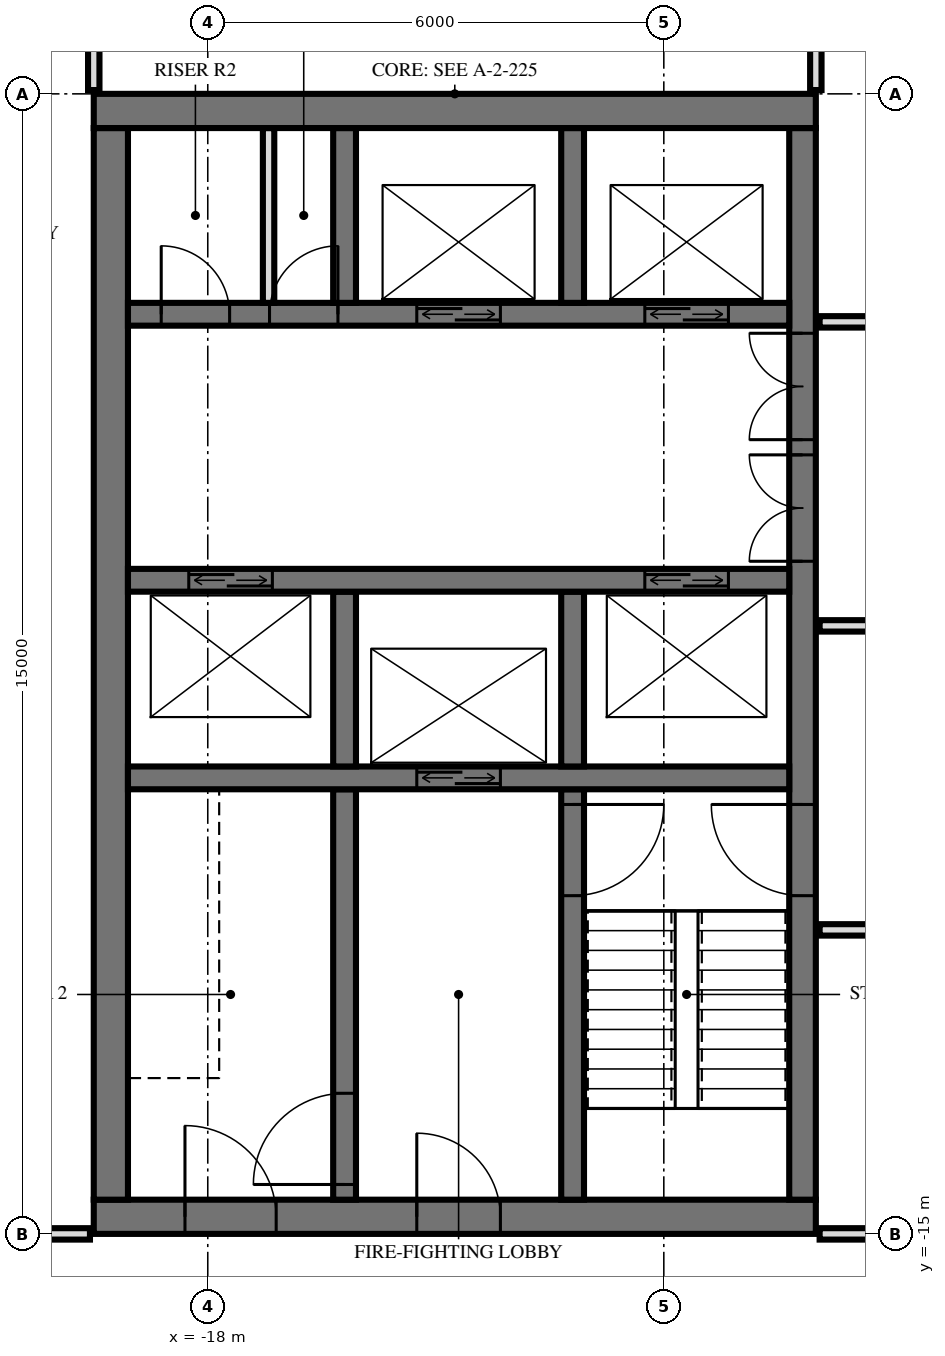
"""IFC4 building model, lengths in metres.
Left out: names, types, materials, properties, quantities, classifications, styles, units other than length and angle.
Written with IfcOpenShell. Run it as: python <this file> out.ifc"""

import sys

from ifc_helpers import new_model, si_unit, direction, frame, frame_2d, origin, place, context, subcontext, project, spatial, rectangle, extrude, element, fill, save


model = new_model("IFC4")
c1 = context("Model", 3, precision=1e-05, world=origin(), true_north=direction((0.0, 1.0)))
c2 = subcontext(c1, "Body", "Model", "MODEL_VIEW")
j1 = project(units=[si_unit("LENGTHUNIT", "METRE"), si_unit("PLANEANGLEUNIT", "RADIAN")], contexts=[c1])
p1 = place(None, origin())
s1 = spatial("IfcSite", under=j1, at=p1, CompositionType="ELEMENT")
p2 = place(p1, origin())
s2 = spatial("IfcBuilding", under=s1, at=p2, CompositionType="ELEMENT")
p3 = place(p2, frame((0.0, 0.0, 342.6)))
s3 = spatial("IfcBuildingStorey", under=s2, at=p3, CompositionType="ELEMENT", Elevation=342.6)
p4 = place(p3, frame((-19.5, -0.225, 0.0), z_axis=(0.0, 0.0, 1.0), x_axis=(1.0, 0.0, 0.0)))
e1 = element("IfcWall", 1, at=p4, inside=s3, PredefinedType="SHEAR", context=c2, shape_type="SweptSolid", body=[
    extrude(rectangle(XDim=9.5, YDim=0.45, at=frame_2d((4.75, 0.0))), origin(), (0.0, 0.0, 1.0), 4.0),
])
p5 = place(p3, frame((-19.5, -14.775, 0.0), z_axis=(0.0, 0.0, 1.0), x_axis=(1.0, 0.0, 0.0)))
e2 = element("IfcWall", 2, at=p5, inside=s3, PredefinedType="SHEAR", context=c2, shape_type="SweptSolid", body=[
    extrude(rectangle(XDim=9.5, YDim=0.45, at=frame_2d((4.75, 0.0))), origin(), (0.0, 0.0, 1.0), 4.0),
])
p6 = place(p5, frame((1.2, 0.0, 0.0)))
e3 = element("IfcOpeningElement", 3, at=p6, cuts=e2, PredefinedType="OPENING", context=c2, shape_type="SweptSolid", body=[
    extrude(rectangle(XDim=1.2, YDim=2.1, at=frame_2d((0.6, 1.05))), frame((0.0, 0.235, 0.0), z_axis=(0.0, -1.0, 0.0), x_axis=(1.0, 0.0, 0.0)), (0.0, 0.0, 1.0), 0.47),
])
p7 = place(p5, frame((4.25, 0.0, 0.0)))
e4 = element("IfcOpeningElement", 4, at=p7, cuts=e2, PredefinedType="OPENING", context=c2, shape_type="SweptSolid", body=[
    extrude(rectangle(XDim=1.1, YDim=2.1, at=frame_2d((0.55, 1.05))), frame((0.0, 0.235, 0.0), z_axis=(0.0, -1.0, 0.0), x_axis=(1.0, 0.0, 0.0)), (0.0, 0.0, 1.0), 0.47),
])
p8 = place(p3, frame((-10.175, -14.55, 0.0), z_axis=(0.0, 0.0, 1.0), x_axis=(0.0, 1.0, 0.0)))
e5 = element("IfcWall", 5, at=p8, inside=s3, PredefinedType="SHEAR", context=c2, shape_type="SweptSolid", body=[
    extrude(rectangle(XDim=14.1, YDim=0.35, at=frame_2d((7.05, 0.0))), origin(), (0.0, 0.0, 1.0), 4.0),
])
p9 = place(p8, frame((8.4, 0.0, 0.0)))
e6 = element("IfcOpeningElement", 6, at=p9, cuts=e5, PredefinedType="OPENING", context=c2, shape_type="SweptSolid", body=[
    extrude(rectangle(XDim=1.4, YDim=2.4, at=frame_2d((0.7, 1.2))), frame((0.0, 0.185, 0.0), z_axis=(0.0, -1.0, 0.0), x_axis=(1.0, 0.0, 0.0)), (0.0, 0.0, 1.0), 0.37),
])
p10 = place(p8, frame((10.0, 0.0, 0.0)))
e7 = element("IfcOpeningElement", 7, at=p10, cuts=e5, PredefinedType="OPENING", context=c2, shape_type="SweptSolid", body=[
    extrude(rectangle(XDim=1.4, YDim=2.4, at=frame_2d((0.7, 1.2))), frame((0.0, 0.185, 0.0), z_axis=(0.0, -1.0, 0.0), x_axis=(1.0, 0.0, 0.0)), (0.0, 0.0, 1.0), 0.37),
])
p11 = place(p8, frame((4.0, 0.0, 0.0)))
e8 = element("IfcOpeningElement", 8, at=p11, cuts=e5, PredefinedType="OPENING", context=c2, shape_type="SweptSolid", body=[
    extrude(rectangle(XDim=1.2, YDim=2.1, at=frame_2d((0.6, 1.05))), frame((0.0, 0.185, 0.0), z_axis=(0.0, -1.0, 0.0), x_axis=(1.0, 0.0, 0.0)), (0.0, 0.0, 1.0), 0.37),
])
p12 = place(p3, frame((-19.275, -14.55, 0.0), z_axis=(0.0, 0.0, 1.0), x_axis=(0.0, 1.0, 0.0)))
e9 = element("IfcWall", 9, at=p12, inside=s3, PredefinedType="SHEAR", context=c2, shape_type="SweptSolid", body=[
    extrude(rectangle(XDim=14.1, YDim=0.45, at=frame_2d((7.05, 0.0))), origin(), (0.0, 0.0, 1.0), 4.0),
])
p13 = place(p3, frame((-19.05, -2.9, 0.0), z_axis=(0.0, 0.0, 1.0), x_axis=(1.0, 0.0, 0.0)))
e10 = element("IfcWall", 10, at=p13, inside=s3, PredefinedType="SHEAR", context=c2, shape_type="SweptSolid", body=[
    extrude(rectangle(XDim=8.7, YDim=0.3, at=frame_2d((4.35, 0.0))), origin(), (0.0, 0.0, 1.0), 4.0),
])
p14 = place(p13, frame((6.8, 0.0, 0.0)))
e11 = element("IfcOpeningElement", 11, at=p14, cuts=e10, PredefinedType="OPENING", context=c2, shape_type="SweptSolid", body=[
    extrude(rectangle(XDim=1.1, YDim=2.1, at=frame_2d((0.55, 1.05))), frame((0.0, 0.16, 0.0), z_axis=(0.0, -1.0, 0.0), x_axis=(1.0, 0.0, 0.0)), (0.0, 0.0, 1.0), 0.32),
])
p15 = place(p13, frame((3.8, 0.0, 0.0)))
e12 = element("IfcOpeningElement", 12, at=p15, cuts=e10, PredefinedType="OPENING", context=c2, shape_type="SweptSolid", body=[
    extrude(rectangle(XDim=1.1, YDim=2.1, at=frame_2d((0.55, 1.05))), frame((0.0, 0.16, 0.0), z_axis=(0.0, -1.0, 0.0), x_axis=(1.0, 0.0, 0.0)), (0.0, 0.0, 1.0), 0.32),
])
p16 = place(p13, frame((1.863, 0.0, 0.0)))
e13 = element("IfcOpeningElement", 13, at=p16, cuts=e10, PredefinedType="OPENING", context=c2, shape_type="SweptSolid", body=[
    extrude(rectangle(XDim=0.9, YDim=2.1, at=frame_2d((0.45, 1.05))), frame((0.0, 0.16, 0.0), z_axis=(0.0, -1.0, 0.0), x_axis=(1.0, 0.0, 0.0)), (0.0, 0.0, 1.0), 0.32),
])
p17 = place(p13, frame((0.438, 0.0, 0.0)))
e14 = element("IfcOpeningElement", 14, at=p17, cuts=e10, PredefinedType="OPENING", context=c2, shape_type="SweptSolid", body=[
    extrude(rectangle(XDim=0.9, YDim=2.1, at=frame_2d((0.45, 1.05))), frame((0.0, 0.16, 0.0), z_axis=(0.0, -1.0, 0.0), x_axis=(1.0, 0.0, 0.0)), (0.0, 0.0, 1.0), 0.32),
])
p18 = place(p3, frame((-19.05, -6.4, 0.0), z_axis=(0.0, 0.0, 1.0), x_axis=(1.0, 0.0, 0.0)))
e15 = element("IfcWall", 15, at=p18, inside=s3, PredefinedType="SHEAR", context=c2, shape_type="SweptSolid", body=[
    extrude(rectangle(XDim=8.7, YDim=0.3, at=frame_2d((4.35, 0.0))), origin(), (0.0, 0.0, 1.0), 4.0),
])
p19 = place(p18, frame((6.8, 0.0, 0.0)))
e16 = element("IfcOpeningElement", 16, at=p19, cuts=e15, PredefinedType="OPENING", context=c2, shape_type="SweptSolid", body=[
    extrude(rectangle(XDim=1.1, YDim=2.1, at=frame_2d((0.55, 1.05))), frame((0.0, 0.16, 0.0), z_axis=(0.0, -1.0, 0.0), x_axis=(1.0, 0.0, 0.0)), (0.0, 0.0, 1.0), 0.32),
])
p20 = place(p18, frame((0.8, 0.0, 0.0)))
e17 = element("IfcOpeningElement", 17, at=p20, cuts=e15, PredefinedType="OPENING", context=c2, shape_type="SweptSolid", body=[
    extrude(rectangle(XDim=1.1, YDim=2.1, at=frame_2d((0.55, 1.05))), frame((0.0, 0.16, 0.0), z_axis=(0.0, -1.0, 0.0), x_axis=(1.0, 0.0, 0.0)), (0.0, 0.0, 1.0), 0.32),
])
p21 = place(p3, frame((-19.05, -9.0, 0.0), z_axis=(0.0, 0.0, 1.0), x_axis=(1.0, 0.0, 0.0)))
e18 = element("IfcWall", 18, at=p21, inside=s3, PredefinedType="SHEAR", context=c2, shape_type="SweptSolid", body=[
    extrude(rectangle(XDim=8.7, YDim=0.3, at=frame_2d((4.35, 0.0))), origin(), (0.0, 0.0, 1.0), 4.0),
])
p22 = place(p21, frame((3.8, 0.0, 0.0)))
e19 = element("IfcOpeningElement", 19, at=p22, cuts=e18, PredefinedType="OPENING", context=c2, shape_type="SweptSolid", body=[
    extrude(rectangle(XDim=1.1, YDim=2.1, at=frame_2d((0.55, 1.05))), frame((0.0, 0.16, 0.0), z_axis=(0.0, -1.0, 0.0), x_axis=(1.0, 0.0, 0.0)), (0.0, 0.0, 1.0), 0.32),
])
for number, where, z_axis, x_axis in (
    (20, (-13.2, -2.75, 0.0), (0.0, 0.0, 1.0), (0.0, 1.0, 0.0)),
    (21, (-13.2, -8.85, 0.0), (0.0, 0.0, 1.0), (0.0, 1.0, 0.0)),
):
    element("IfcWall", number, at=place(p3, frame(where, z_axis=z_axis, x_axis=x_axis)), inside=s3, PredefinedType="SHEAR", context=c2, shape_type="SweptSolid", body=[
        extrude(rectangle(XDim=2.3, YDim=0.3, at=frame_2d((1.15, 0.0))), origin(), (0.0, 0.0, 1.0), 4.0),
    ])
p23 = place(p3, frame((-13.2, -14.55, 0.0), z_axis=(0.0, 0.0, 1.0), x_axis=(0.0, 1.0, 0.0)))
e22 = element("IfcWall", 22, at=p23, inside=s3, PredefinedType="SHEAR", context=c2, shape_type="SweptSolid", body=[
    extrude(rectangle(XDim=5.4, YDim=0.3, at=frame_2d((2.7, 0.0))), origin(), (0.0, 0.0, 1.0), 4.0),
])
p24 = place(p23, frame((4.0, 0.0, 0.0)))
e23 = element("IfcOpeningElement", 23, at=p24, cuts=e22, PredefinedType="OPENING", context=c2, shape_type="SweptSolid", body=[
    extrude(rectangle(XDim=1.2, YDim=2.1, at=frame_2d((0.6, 1.05))), frame((0.0, 0.16, 0.0), z_axis=(0.0, -1.0, 0.0), x_axis=(1.0, 0.0, 0.0)), (0.0, 0.0, 1.0), 0.32),
])
for number, where, z_axis, x_axis in (
    (24, (-16.2, -2.75, 0.0), (0.0, 0.0, 1.0), (0.0, 1.0, 0.0)),
    (25, (-16.2, -8.85, 0.0), (0.0, 0.0, 1.0), (0.0, 1.0, 0.0)),
):
    element("IfcWall", number, at=place(p3, frame(where, z_axis=z_axis, x_axis=x_axis)), inside=s3, PredefinedType="SHEAR", context=c2, shape_type="SweptSolid", body=[
        extrude(rectangle(XDim=2.3, YDim=0.3, at=frame_2d((1.15, 0.0))), origin(), (0.0, 0.0, 1.0), 4.0),
    ])
p25 = place(p3, frame((-16.2, -14.55, 0.0), z_axis=(0.0, 0.0, 1.0), x_axis=(0.0, 1.0, 0.0)))
e26 = element("IfcWall", 26, at=p25, inside=s3, PredefinedType="SHEAR", context=c2, shape_type="SweptSolid", body=[
    extrude(rectangle(XDim=5.4, YDim=0.3, at=frame_2d((2.7, 0.0))), origin(), (0.0, 0.0, 1.0), 4.0),
])
p26 = place(p25, frame((0.2, 0.0, 0.0)))
e27 = element("IfcOpeningElement", 27, at=p26, cuts=e26, PredefinedType="OPENING", context=c2, shape_type="SweptSolid", body=[
    extrude(rectangle(XDim=1.2, YDim=2.1, at=frame_2d((0.6, 1.05))), frame((0.0, 0.16, 0.0), z_axis=(0.0, -1.0, 0.0), x_axis=(1.0, 0.0, 0.0)), (0.0, 0.0, 1.0), 0.32),
])
p27 = place(p3, frame((-19.568, 1.175, 0.0), z_axis=(0.0, 0.0, 1.0), x_axis=(-0.949694735798, -0.313177120489, 0.0)))
e28 = element("IfcWall", 28, at=p27, inside=s3, PredefinedType="SOLIDWALL", context=c2, shape_type="SweptSolid", body=[
    extrude(rectangle(XDim=1.681, YDim=0.25, at=frame_2d((0.841, 0.0))), origin(), (0.0, 0.0, 1.0), 3.72),
])
p28 = place(p3, frame((-17.2, -2.75, 0.0), z_axis=(0.0, 0.0, 1.0), x_axis=(0.0, 1.0, 0.0)))
e29 = element("IfcWall", 29, at=p28, inside=s3, PredefinedType="PARTITIONING", context=c2, shape_type="SweptSolid", body=[
    extrude(rectangle(XDim=2.3, YDim=0.15, at=frame_2d((1.15, 0.0))), origin(), (0.0, 0.0, 1.0), 3.7),
])
p29 = place(p3, frame((-10.0, 0.05, 0.0), z_axis=(0.0, 0.0, 1.0), x_axis=(0.0, 1.0, 0.0)))
e30 = element("IfcWall", 30, at=p29, inside=s3, PredefinedType="PLUMBINGWALL", context=c2, shape_type="SweptSolid", body=[
    extrude(rectangle(XDim=2.247, YDim=0.15, at=frame_2d((1.123, 0.0))), origin(), (0.0, 0.0, 1.0), 3.72),
])
p30 = place(p3, frame((-19.5, 0.05, 0.0), z_axis=(0.0, 0.0, 1.0), x_axis=(0.0, 1.0, 0.0)))
e31 = element("IfcWall", 31, at=p30, inside=s3, PredefinedType="PARTITIONING", context=c2, shape_type="SweptSolid", body=[
    extrude(rectangle(XDim=1.08, YDim=0.15, at=frame_2d((0.54, 0.0))), origin(), (0.0, 0.0, 1.0), 3.72),
])
p31 = place(p3, frame((-21.935, -15.0, 0.0), z_axis=(0.0, 0.0, 1.0), x_axis=(1.0, 0.0, 0.0)))
e32 = element("IfcWall", 32, at=p31, inside=s3, PredefinedType="PARTITIONING", context=c2, shape_type="SweptSolid", body=[
    extrude(rectangle(XDim=2.385, YDim=0.15, at=frame_2d((1.192, 0.0))), origin(), (0.0, 0.0, 1.0), 3.72),
])
p32 = place(p31, frame((0.627, 0.0, 0.0)))
e33 = element("IfcOpeningElement", 33, at=p32, cuts=e32, PredefinedType="OPENING", context=c2, shape_type="SweptSolid", body=[
    extrude(rectangle(XDim=1.0, YDim=2.1, at=frame_2d((0.5, 1.05))), frame((0.0, 0.085, 0.0), z_axis=(0.0, -1.0, 0.0), x_axis=(1.0, 0.0, 0.0)), (0.0, 0.0, 1.0), 0.17),
])
p33 = place(p3, frame((-9.95, -15.0, 0.0), z_axis=(0.0, 0.0, 1.0), x_axis=(1.0, 0.0, 0.0)))
e34 = element("IfcWall", 34, at=p33, inside=s3, PredefinedType="PARTITIONING", context=c2, shape_type="SweptSolid", body=[
    extrude(rectangle(XDim=19.9, YDim=0.15, at=frame_2d((9.95, 0.0))), origin(), (0.0, 0.0, 1.0), 3.084),
])
p34 = place(p33, frame((9.43, 0.0, 0.0)))
e35 = element("IfcOpeningElement", 35, at=p34, cuts=e34, PredefinedType="OPENING", context=c2, shape_type="SweptSolid", body=[
    extrude(rectangle(XDim=1.0, YDim=2.1, at=frame_2d((0.5, 1.05))), frame((0.0, 0.085, 0.0), z_axis=(0.0, -1.0, 0.0), x_axis=(1.0, 0.0, 0.0)), (0.0, 0.0, 1.0), 0.17),
])
p35 = place(p3, frame((-9.95, -11.0, 0.0), z_axis=(0.0, 0.0, 1.0), x_axis=(1.0, 0.0, 0.0)))
e36 = element("IfcWall", 36, at=p35, inside=s3, PredefinedType="PARTITIONING", context=c2, shape_type="SweptSolid", body=[
    extrude(rectangle(XDim=19.9, YDim=0.15, at=frame_2d((9.95, 0.0))), origin(), (0.0, 0.0, 1.0), 3.72),
])
p36 = place(p35, frame((9.45, 0.0, 0.0)))
e37 = element("IfcOpeningElement", 37, at=p36, cuts=e36, PredefinedType="OPENING", context=c2, shape_type="SweptSolid", body=[
    extrude(rectangle(XDim=1.0, YDim=2.1, at=frame_2d((0.5, 1.05))), frame((0.0, 0.085, 0.0), z_axis=(0.0, -1.0, 0.0), x_axis=(1.0, 0.0, 0.0)), (0.0, 0.0, 1.0), 0.17),
])
p37 = place(p35, frame((15.45, 0.0, 0.0)))
e38 = element("IfcOpeningElement", 38, at=p37, cuts=e36, PredefinedType="OPENING", context=c2, shape_type="SweptSolid", body=[
    extrude(rectangle(XDim=1.0, YDim=2.1, at=frame_2d((0.5, 1.05))), frame((0.0, 0.085, 0.0), z_axis=(0.0, -1.0, 0.0), x_axis=(1.0, 0.0, 0.0)), (0.0, 0.0, 1.0), 0.17),
])
p38 = place(p3, frame((-9.95, -7.0, 0.0), z_axis=(0.0, 0.0, 1.0), x_axis=(1.0, 0.0, 0.0)))
e39 = element("IfcWall", 39, at=p38, inside=s3, PredefinedType="PARTITIONING", context=c2, shape_type="SweptSolid", body=[
    extrude(rectangle(XDim=19.9, YDim=0.15, at=frame_2d((9.95, 0.0))), origin(), (0.0, 0.0, 1.0), 3.72),
])
p39 = place(p38, frame((9.45, 0.0, 0.0)))
e40 = element("IfcOpeningElement", 40, at=p39, cuts=e39, PredefinedType="OPENING", context=c2, shape_type="SweptSolid", body=[
    extrude(rectangle(XDim=1.0, YDim=2.1, at=frame_2d((0.5, 1.05))), frame((0.0, 0.085, 0.0), z_axis=(0.0, -1.0, 0.0), x_axis=(1.0, 0.0, 0.0)), (0.0, 0.0, 1.0), 0.17),
])
p40 = place(p38, frame((3.45, 0.0, 0.0)))
e41 = element("IfcOpeningElement", 41, at=p40, cuts=e39, PredefinedType="OPENING", context=c2, shape_type="SweptSolid", body=[
    extrude(rectangle(XDim=1.0, YDim=2.1, at=frame_2d((0.5, 1.05))), frame((0.0, 0.085, 0.0), z_axis=(0.0, -1.0, 0.0), x_axis=(1.0, 0.0, 0.0)), (0.0, 0.0, 1.0), 0.17),
])
p41 = place(p3, frame((-9.95, -3.0, 0.0), z_axis=(0.0, 0.0, 1.0), x_axis=(1.0, 0.0, 0.0)))
e42 = element("IfcWall", 42, at=p41, inside=s3, PredefinedType="PARTITIONING", context=c2, shape_type="SweptSolid", body=[
    extrude(rectangle(XDim=19.9, YDim=0.15, at=frame_2d((9.95, 0.0))), origin(), (0.0, 0.0, 1.0), 3.72),
])
p42 = place(p41, frame((0.95, 0.0, 0.0)))
e43 = element("IfcOpeningElement", 43, at=p42, cuts=e42, PredefinedType="OPENING", context=c2, shape_type="SweptSolid", body=[
    extrude(rectangle(XDim=1.0, YDim=2.1, at=frame_2d((0.5, 1.05))), frame((0.0, 0.085, 0.0), z_axis=(0.0, -1.0, 0.0), x_axis=(1.0, 0.0, 0.0)), (0.0, 0.0, 1.0), 0.17),
])
p43 = place(p41, frame((3.7, 0.0, 0.0)))
e44 = element("IfcOpeningElement", 44, at=p43, cuts=e42, PredefinedType="OPENING", context=c2, shape_type="SweptSolid", body=[
    extrude(rectangle(XDim=1.0, YDim=2.1, at=frame_2d((0.5, 1.05))), frame((0.0, 0.085, 0.0), z_axis=(0.0, -1.0, 0.0), x_axis=(1.0, 0.0, 0.0)), (0.0, 0.0, 1.0), 0.17),
])
p44 = place(p41, frame((8.95, 0.0, 0.0)))
e45 = element("IfcOpeningElement", 45, at=p44, cuts=e42, PredefinedType="OPENING", context=c2, shape_type="SweptSolid", body=[
    extrude(rectangle(XDim=1.0, YDim=2.1, at=frame_2d((0.5, 1.05))), frame((0.0, 0.085, 0.0), z_axis=(0.0, -1.0, 0.0), x_axis=(1.0, 0.0, 0.0)), (0.0, 0.0, 1.0), 0.17),
])
p45 = place(p41, frame((16.2, 0.0, 0.0)))
e46 = element("IfcOpeningElement", 46, at=p45, cuts=e42, PredefinedType="OPENING", context=c2, shape_type="SweptSolid", body=[
    extrude(rectangle(XDim=1.0, YDim=2.1, at=frame_2d((0.5, 1.05))), frame((0.0, 0.085, 0.0), z_axis=(0.0, -1.0, 0.0), x_axis=(1.0, 0.0, 0.0)), (0.0, 0.0, 1.0), 0.17),
])
p46 = place(p14, origin())
e47 = element("IfcDoor", 47, at=p46, inside=s3, OperationType="DOUBLE_DOOR_SLIDING", PredefinedType="USERDEFINED", context=c2, shape_type="SweptSolid", body=[
    extrude(rectangle(XDim=1.1, YDim=2.1, at=frame_2d((0.55, 1.05))), frame((0.0, 0.025, 0.0), z_axis=(0.0, -1.0, 0.0), x_axis=(1.0, 0.0, 0.0)), (0.0, 0.0, 1.0), 0.05),
])
fill(e11, e47)
p47 = place(p15, origin())
e48 = element("IfcDoor", 48, at=p47, inside=s3, OperationType="DOUBLE_DOOR_SLIDING", PredefinedType="USERDEFINED", context=c2, shape_type="SweptSolid", body=[
    extrude(rectangle(XDim=1.1, YDim=2.1, at=frame_2d((0.55, 1.05))), frame((0.0, 0.025, 0.0), z_axis=(0.0, -1.0, 0.0), x_axis=(1.0, 0.0, 0.0)), (0.0, 0.0, 1.0), 0.05),
])
fill(e12, e48)
p48 = place(p19, origin())
e49 = element("IfcDoor", 49, at=p48, inside=s3, OperationType="DOUBLE_DOOR_SLIDING", PredefinedType="USERDEFINED", context=c2, shape_type="SweptSolid", body=[
    extrude(rectangle(XDim=1.1, YDim=2.1, at=frame_2d((0.55, 1.05))), frame((0.0, 0.025, 0.0), z_axis=(0.0, -1.0, 0.0), x_axis=(1.0, 0.0, 0.0)), (0.0, 0.0, 1.0), 0.05),
])
fill(e16, e49)
p49 = place(p22, origin())
e50 = element("IfcDoor", 50, at=p49, inside=s3, OperationType="DOUBLE_DOOR_SLIDING", PredefinedType="USERDEFINED", context=c2, shape_type="SweptSolid", body=[
    extrude(rectangle(XDim=1.1, YDim=2.1, at=frame_2d((0.55, 1.05))), frame((0.0, 0.025, 0.0), z_axis=(0.0, -1.0, 0.0), x_axis=(1.0, 0.0, 0.0)), (0.0, 0.0, 1.0), 0.05),
])
fill(e19, e50)
p50 = place(p20, origin())
e51 = element("IfcDoor", 51, at=p50, inside=s3, OperationType="DOUBLE_DOOR_SLIDING", PredefinedType="USERDEFINED", context=c2, shape_type="SweptSolid", body=[
    extrude(rectangle(XDim=1.1, YDim=2.1, at=frame_2d((0.55, 1.05))), frame((0.0, 0.025, 0.0), z_axis=(0.0, -1.0, 0.0), x_axis=(1.0, 0.0, 0.0)), (0.0, 0.0, 1.0), 0.05),
])
fill(e17, e51)
p51 = place(p9, origin())
e52 = element("IfcDoor", 52, at=p51, inside=s3, OperationType="DOUBLE_DOOR_SINGLE_SWING", PredefinedType="DOOR", context=c2, shape_type="SweptSolid", body=[
    extrude(rectangle(XDim=1.4, YDim=2.4, at=frame_2d((0.7, 1.2))), frame((0.0, 0.025, 0.0), z_axis=(0.0, -1.0, 0.0), x_axis=(1.0, 0.0, 0.0)), (0.0, 0.0, 1.0), 0.05),
])
fill(e6, e52)
p52 = place(p10, origin())
e53 = element("IfcDoor", 53, at=p52, inside=s3, OperationType="DOUBLE_DOOR_SINGLE_SWING", PredefinedType="DOOR", context=c2, shape_type="SweptSolid", body=[
    extrude(rectangle(XDim=1.4, YDim=2.4, at=frame_2d((0.7, 1.2))), frame((0.0, 0.025, 0.0), z_axis=(0.0, -1.0, 0.0), x_axis=(1.0, 0.0, 0.0)), (0.0, 0.0, 1.0), 0.05),
])
fill(e7, e53)
p53 = place(p11, origin())
e54 = element("IfcDoor", 54, at=p53, inside=s3, OperationType="SINGLE_SWING_LEFT", PredefinedType="DOOR", context=c2, shape_type="SweptSolid", body=[
    extrude(rectangle(XDim=1.2, YDim=2.1, at=frame_2d((0.6, 1.05))), frame((0.0, 0.025, 0.0), z_axis=(0.0, -1.0, 0.0), x_axis=(1.0, 0.0, 0.0)), (0.0, 0.0, 1.0), 0.05),
])
fill(e8, e54)
p54 = place(p6, origin())
e55 = element("IfcDoor", 55, at=p54, inside=s3, OperationType="SINGLE_SWING_RIGHT", PredefinedType="DOOR", context=c2, shape_type="SweptSolid", body=[
    extrude(rectangle(XDim=1.2, YDim=2.1, at=frame_2d((0.6, 1.05))), frame((0.0, 0.025, 0.0), z_axis=(0.0, -1.0, 0.0), x_axis=(1.0, 0.0, 0.0)), (0.0, 0.0, 1.0), 0.05),
])
fill(e3, e55)
p55 = place(p7, origin())
e56 = element("IfcDoor", 56, at=p55, inside=s3, OperationType="SINGLE_SWING_RIGHT", PredefinedType="DOOR", context=c2, shape_type="SweptSolid", body=[
    extrude(rectangle(XDim=1.1, YDim=2.1, at=frame_2d((0.55, 1.05))), frame((0.0, 0.025, 0.0), z_axis=(0.0, -1.0, 0.0), x_axis=(1.0, 0.0, 0.0)), (0.0, 0.0, 1.0), 0.05),
])
fill(e4, e56)
p56 = place(p16, origin())
e57 = element("IfcDoor", 57, at=p56, inside=s3, OperationType="SINGLE_SWING_LEFT", PredefinedType="DOOR", context=c2, shape_type="SweptSolid", body=[
    extrude(rectangle(XDim=0.9, YDim=2.1, at=frame_2d((0.45, 1.05))), frame((0.0, 0.025, 0.0), z_axis=(0.0, -1.0, 0.0), x_axis=(1.0, 0.0, 0.0)), (0.0, 0.0, 1.0), 0.05),
])
fill(e13, e57)
p57 = place(p17, origin())
e58 = element("IfcDoor", 58, at=p57, inside=s3, OperationType="SINGLE_SWING_RIGHT", PredefinedType="DOOR", context=c2, shape_type="SweptSolid", body=[
    extrude(rectangle(XDim=0.9, YDim=2.1, at=frame_2d((0.45, 1.05))), frame((0.0, 0.025, 0.0), z_axis=(0.0, -1.0, 0.0), x_axis=(1.0, 0.0, 0.0)), (0.0, 0.0, 1.0), 0.05),
])
fill(e14, e58)
p58 = place(p24, frame((0.6, 0.0, 0.0), z_axis=(0.0, 0.0, 1.0), x_axis=(-1.0, 0.0, 0.0)))
e59 = element("IfcDoor", 59, at=p58, inside=s3, OperationType="SINGLE_SWING_RIGHT", PredefinedType="DOOR", context=c2, shape_type="SweptSolid", body=[
    extrude(rectangle(XDim=1.2, YDim=2.1, at=frame_2d((0.0, 1.05))), frame((0.0, -0.025, 0.0), z_axis=(0.0, 1.0, 0.0), x_axis=(-1.0, 0.0, 0.0)), (0.0, 0.0, 1.0), 0.05),
])
fill(e23, e59)
p59 = place(p26, origin())
e60 = element("IfcDoor", 60, at=p59, inside=s3, OperationType="SINGLE_SWING_RIGHT", PredefinedType="DOOR", context=c2, shape_type="SweptSolid", body=[
    extrude(rectangle(XDim=1.2, YDim=2.1, at=frame_2d((0.6, 1.05))), frame((0.0, 0.025, 0.0), z_axis=(0.0, -1.0, 0.0), x_axis=(1.0, 0.0, 0.0)), (0.0, 0.0, 1.0), 0.05),
])
fill(e27, e60)
save(model, sys.argv[1])
